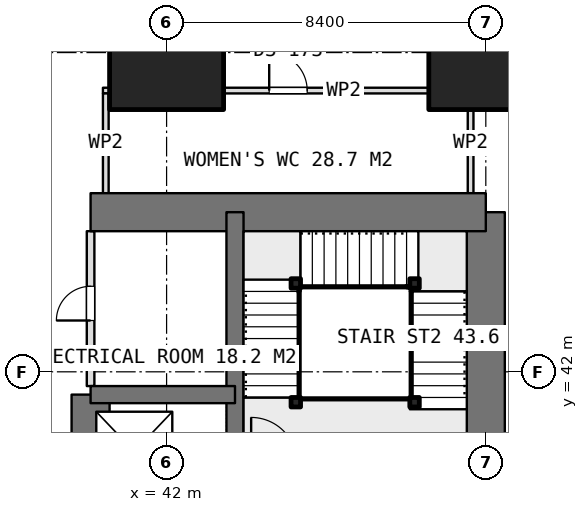
"""IFC4 building model, lengths in metres.
Left out: names, types, materials, properties, quantities, classifications, styles, units other than length and angle.
Written with IfcOpenShell. Run it as: python <this file> out.ifc"""

import sys

from ifc_helpers import new_model, si_unit, direction, frame, frame_2d, origin, origin_2d, place, context, subcontext, project, spatial, rectangle, extrude, element, fill, save


model = new_model("IFC4")
c1 = context("Model", 3, precision=1e-05, world=origin(), true_north=direction((0.0, 1.0)))
c2 = subcontext(c1, "Body", "Model", "MODEL_VIEW")
j1 = project(units=[si_unit("LENGTHUNIT", "METRE"), si_unit("PLANEANGLEUNIT", "RADIAN")], contexts=[c1])
p1 = place(None, origin())
s1 = spatial("IfcSite", under=j1, at=p1, CompositionType="ELEMENT")
p2 = place(p1, origin())
s2 = spatial("IfcBuilding", under=s1, at=p2, CompositionType="ELEMENT")
p3 = place(p2, frame((0.0, 0.0, 159.05)))
s3 = spatial("IfcBuildingStorey", under=s2, at=p3, CompositionType="ELEMENT", Elevation=159.05)
p4 = place(p3, frame((40.0, 46.2, 0.0), z_axis=(0.0, 0.0, 1.0), x_axis=(1.0, 0.0, 0.0)))
e1 = element("IfcWall", 1, at=p4, inside=s3, PredefinedType="SHEAR", context=c2, shape_type="SweptSolid", body=[
    extrude(rectangle(XDim=10.4, YDim=1.0, at=frame_2d((5.2, 0.0))), origin(), (0.0, 0.0, 1.0), 3.75),
])
p5 = place(p3, frame((50.4, 21.0, 0.0), z_axis=(0.0, 0.0, 1.0), x_axis=(0.0, 1.0, 0.0)))
e2 = element("IfcWall", 2, at=p5, inside=s3, PredefinedType="SHEAR", context=c2, shape_type="SweptSolid", body=[
    extrude(rectangle(XDim=25.2, YDim=1.0, at=frame_2d((12.6, 0.0))), origin(), (0.0, 0.0, 1.0), 3.75),
])
p6 = place(p5, frame((16.2, 0.0, 0.0)))
e3 = element("IfcOpeningElement", 3, at=p6, cuts=e2, PredefinedType="OPENING", context=c2, shape_type="SweptSolid", body=[
    extrude(rectangle(XDim=1.2, YDim=2.1, at=frame_2d((0.6, 1.05))), frame((0.0, 0.51, 0.0), z_axis=(0.0, -1.0, 0.0), x_axis=(1.0, 0.0, 0.0)), (0.0, 0.0, 1.0), 1.02),
])
p7 = place(p5, frame((10.05, 0.0, 0.0)))
e4 = element("IfcOpeningElement", 4, at=p7, cuts=e2, PredefinedType="OPENING", context=c2, shape_type="SweptSolid", body=[
    extrude(rectangle(XDim=0.9, YDim=2.1, at=frame_2d((0.45, 1.05))), frame((0.0, 0.51, 0.0), z_axis=(0.0, -1.0, 0.0), x_axis=(1.0, 0.0, 0.0)), (0.0, 0.0, 1.0), 1.02),
])
p8 = place(p5, frame((7.45, 0.0, 0.0)))
e5 = element("IfcOpeningElement", 5, at=p8, cuts=e2, PredefinedType="OPENING", context=c2, shape_type="SweptSolid", body=[
    extrude(rectangle(XDim=0.9, YDim=2.1, at=frame_2d((0.45, 1.05))), frame((0.0, 0.51, 0.0), z_axis=(0.0, -1.0, 0.0), x_axis=(1.0, 0.0, 0.0)), (0.0, 0.0, 1.0), 1.02),
])
p9 = place(p5, frame((0.7, 0.0, 0.0)))
e6 = element("IfcOpeningElement", 6, at=p9, cuts=e2, PredefinedType="OPENING", context=c2, shape_type="SweptSolid", body=[
    extrude(rectangle(XDim=1.2, YDim=2.1, at=frame_2d((0.6, 1.05))), frame((0.0, 0.51, 0.0), z_axis=(0.0, -1.0, 0.0), x_axis=(1.0, 0.0, 0.0)), (0.0, 0.0, 1.0), 1.02),
])
p10 = place(p3, frame((43.8, 21.0, 0.0), z_axis=(0.0, 0.0, 1.0), x_axis=(0.0, 1.0, 0.0)))
e7 = element("IfcWall", 7, at=p10, inside=s3, PredefinedType="SHEAR", context=c2, shape_type="SweptSolid", body=[
    extrude(rectangle(XDim=25.2, YDim=0.45, at=frame_2d((12.6, 0.0))), origin(), (0.0, 0.0, 1.0), 3.75),
])
p11 = place(p3, frame((40.0, 23.4, 0.0), z_axis=(0.0, 0.0, 1.0), x_axis=(0.0, 1.0, 0.0)))
e8 = element("IfcWall", 8, at=p11, inside=s3, PredefinedType="SHEAR", context=c2, shape_type="SweptSolid", body=[
    extrude(rectangle(XDim=18.0, YDim=1.0, at=frame_2d((9.0, 0.0))), origin(), (0.0, 0.0, 1.0), 3.75),
])
p12 = place(p11, frame((2.55, 0.0, 0.0)))
e9 = element("IfcOpeningElement", 9, at=p12, cuts=e8, PredefinedType="OPENING", context=c2, shape_type="SweptSolid", body=[
    extrude(rectangle(XDim=0.9, YDim=2.1, at=frame_2d((0.45, 1.05))), frame((0.0, 0.51, 0.0), z_axis=(0.0, -1.0, 0.0), x_axis=(1.0, 0.0, 0.0)), (0.0, 0.0, 1.0), 1.02),
])
p13 = place(p3, frame((40.0, 41.4, 0.0), z_axis=(0.0, 0.0, 1.0), x_axis=(1.0, 0.0, 0.0)))
e10 = element("IfcWall", 10, at=p13, inside=s3, PredefinedType="SHEAR", context=c2, shape_type="SweptSolid", body=[
    extrude(rectangle(XDim=3.8, YDim=0.45, at=frame_2d((1.9, 0.0))), origin(), (0.0, 0.0, 1.0), 3.75),
])
for number, where, z_axis, x_axis in (
    (11, (42.0, 50.4, 0.0), (0.0, 0.0, 1.0), (1.0, 0.0, 0.0)),
    (12, (50.4, 50.4, 0.0), (0.0, 0.0, 1.0), (1.0, 0.0, 0.0)),
):
    element("IfcColumn", number, at=place(p3, frame(where, z_axis=z_axis, x_axis=x_axis)), inside=s3, PredefinedType="COLUMN", context=c2, shape_type="SweptSolid", body=[
        extrude(rectangle(XDim=3.0, YDim=3.0, at=origin_2d()), origin(), (0.0, 0.0, 1.0), 3.75),
    ])
p14 = place(p3, frame((40.0, 41.625, 0.0), z_axis=(0.0, 0.0, 1.0), x_axis=(0.0, 1.0, 0.0)))
e13 = element("IfcWall", 13, at=p14, inside=s3, PredefinedType="PARTITIONING", context=c2, shape_type="SweptSolid", body=[
    extrude(rectangle(XDim=4.075, YDim=0.2, at=frame_2d((2.038, 0.0))), origin(), (0.0, 0.0, 1.0), 3.4),
])
p15 = place(p14, frame((1.725, 0.0, 0.0)))
e14 = element("IfcOpeningElement", 14, at=p15, cuts=e13, PredefinedType="OPENING", context=c2, shape_type="SweptSolid", body=[
    extrude(rectangle(XDim=0.9, YDim=2.1, at=frame_2d((0.45, 1.05))), frame((0.0, 0.11, 0.0), z_axis=(0.0, -1.0, 0.0), x_axis=(1.0, 0.0, 0.0)), (0.0, 0.0, 1.0), 0.22),
])
p16 = place(p3, frame((40.325, 49.4, 0.0), z_axis=(0.0, 0.0, 1.0), x_axis=(1.0, 0.0, 0.0)))
e15 = element("IfcWall", 15, at=p16, inside=s3, PredefinedType="PARTITIONING", context=c2, shape_type="SweptSolid", body=[
    extrude(rectangle(XDim=9.75, YDim=0.15, at=frame_2d((4.875, 0.0))), origin(), (0.0, 0.0, 1.0), 3.4),
])
p17 = place(p16, frame((4.375, 0.0, 0.0)))
e16 = element("IfcOpeningElement", 16, at=p17, cuts=e15, PredefinedType="OPENING", context=c2, shape_type="SweptSolid", body=[
    extrude(rectangle(XDim=1.0, YDim=2.1, at=frame_2d((0.5, 1.05))), frame((0.0, 0.085, 0.0), z_axis=(0.0, -1.0, 0.0), x_axis=(1.0, 0.0, 0.0)), (0.0, 0.0, 1.0), 0.17),
])
for number, where, z_axis, x_axis in (
    (17, (40.4, 46.7, 0.0), (0.0, 0.0, 1.0), (0.0, 1.0, 0.0)),
    (18, (50.0, 46.7, 0.0), (0.0, 0.0, 1.0), (0.0, 1.0, 0.0)),
):
    element("IfcWall", number, at=place(p3, frame(where, z_axis=z_axis, x_axis=x_axis)), inside=s3, PredefinedType="PARTITIONING", context=c2, shape_type="SweptSolid", body=[
        extrude(rectangle(XDim=2.625, YDim=0.15, at=frame_2d((1.312, 0.0))), origin(), (0.0, 0.0, 1.0), 3.4),
    ])
for number, where, z_axis, x_axis in (
    (19, (45.4, 41.2, 0.0), (0.0, 0.0, 1.0), (1.0, 0.0, 0.0)),
    (20, (45.4, 44.325, 0.0), (0.0, 0.0, 1.0), (1.0, 0.0, 0.0)),
    (21, (48.525, 44.325, 0.0), (0.0, 0.0, 1.0), (1.0, 0.0, 0.0)),
    (22, (48.525, 41.2, 0.0), (0.0, 0.0, 1.0), (1.0, 0.0, 0.0)),
):
    element("IfcColumn", number, at=place(p3, frame(where, z_axis=z_axis, x_axis=x_axis)), inside=s3, PredefinedType="COLUMN", context=c2, shape_type="SweptSolid", body=[
        extrude(rectangle(XDim=0.25, YDim=0.25, at=origin_2d()), origin(), (0.0, 0.0, 1.0), 3.75),
    ])
p18 = place(p15, origin())
e23 = element("IfcDoor", 23, at=p18, inside=s3, OperationType="SINGLE_SWING_LEFT", PredefinedType="DOOR", context=c2, shape_type="SweptSolid", body=[
    extrude(rectangle(XDim=0.9, YDim=2.1, at=frame_2d((0.45, 1.05))), frame((0.0, 0.025, 0.0), z_axis=(0.0, -1.0, 0.0), x_axis=(1.0, 0.0, 0.0)), (0.0, 0.0, 1.0), 0.05),
])
fill(e14, e23)
p19 = place(p17, origin())
e24 = element("IfcDoor", 24, at=p19, inside=s3, OperationType="SINGLE_SWING_LEFT", PredefinedType="DOOR", context=c2, shape_type="SweptSolid", body=[
    extrude(rectangle(XDim=1.0, YDim=2.1, at=frame_2d((0.5, 1.05))), frame((0.0, 0.025, 0.0), z_axis=(0.0, -1.0, 0.0), x_axis=(1.0, 0.0, 0.0)), (0.0, 0.0, 1.0), 0.05),
])
fill(e16, e24)
save(model, sys.argv[1])
